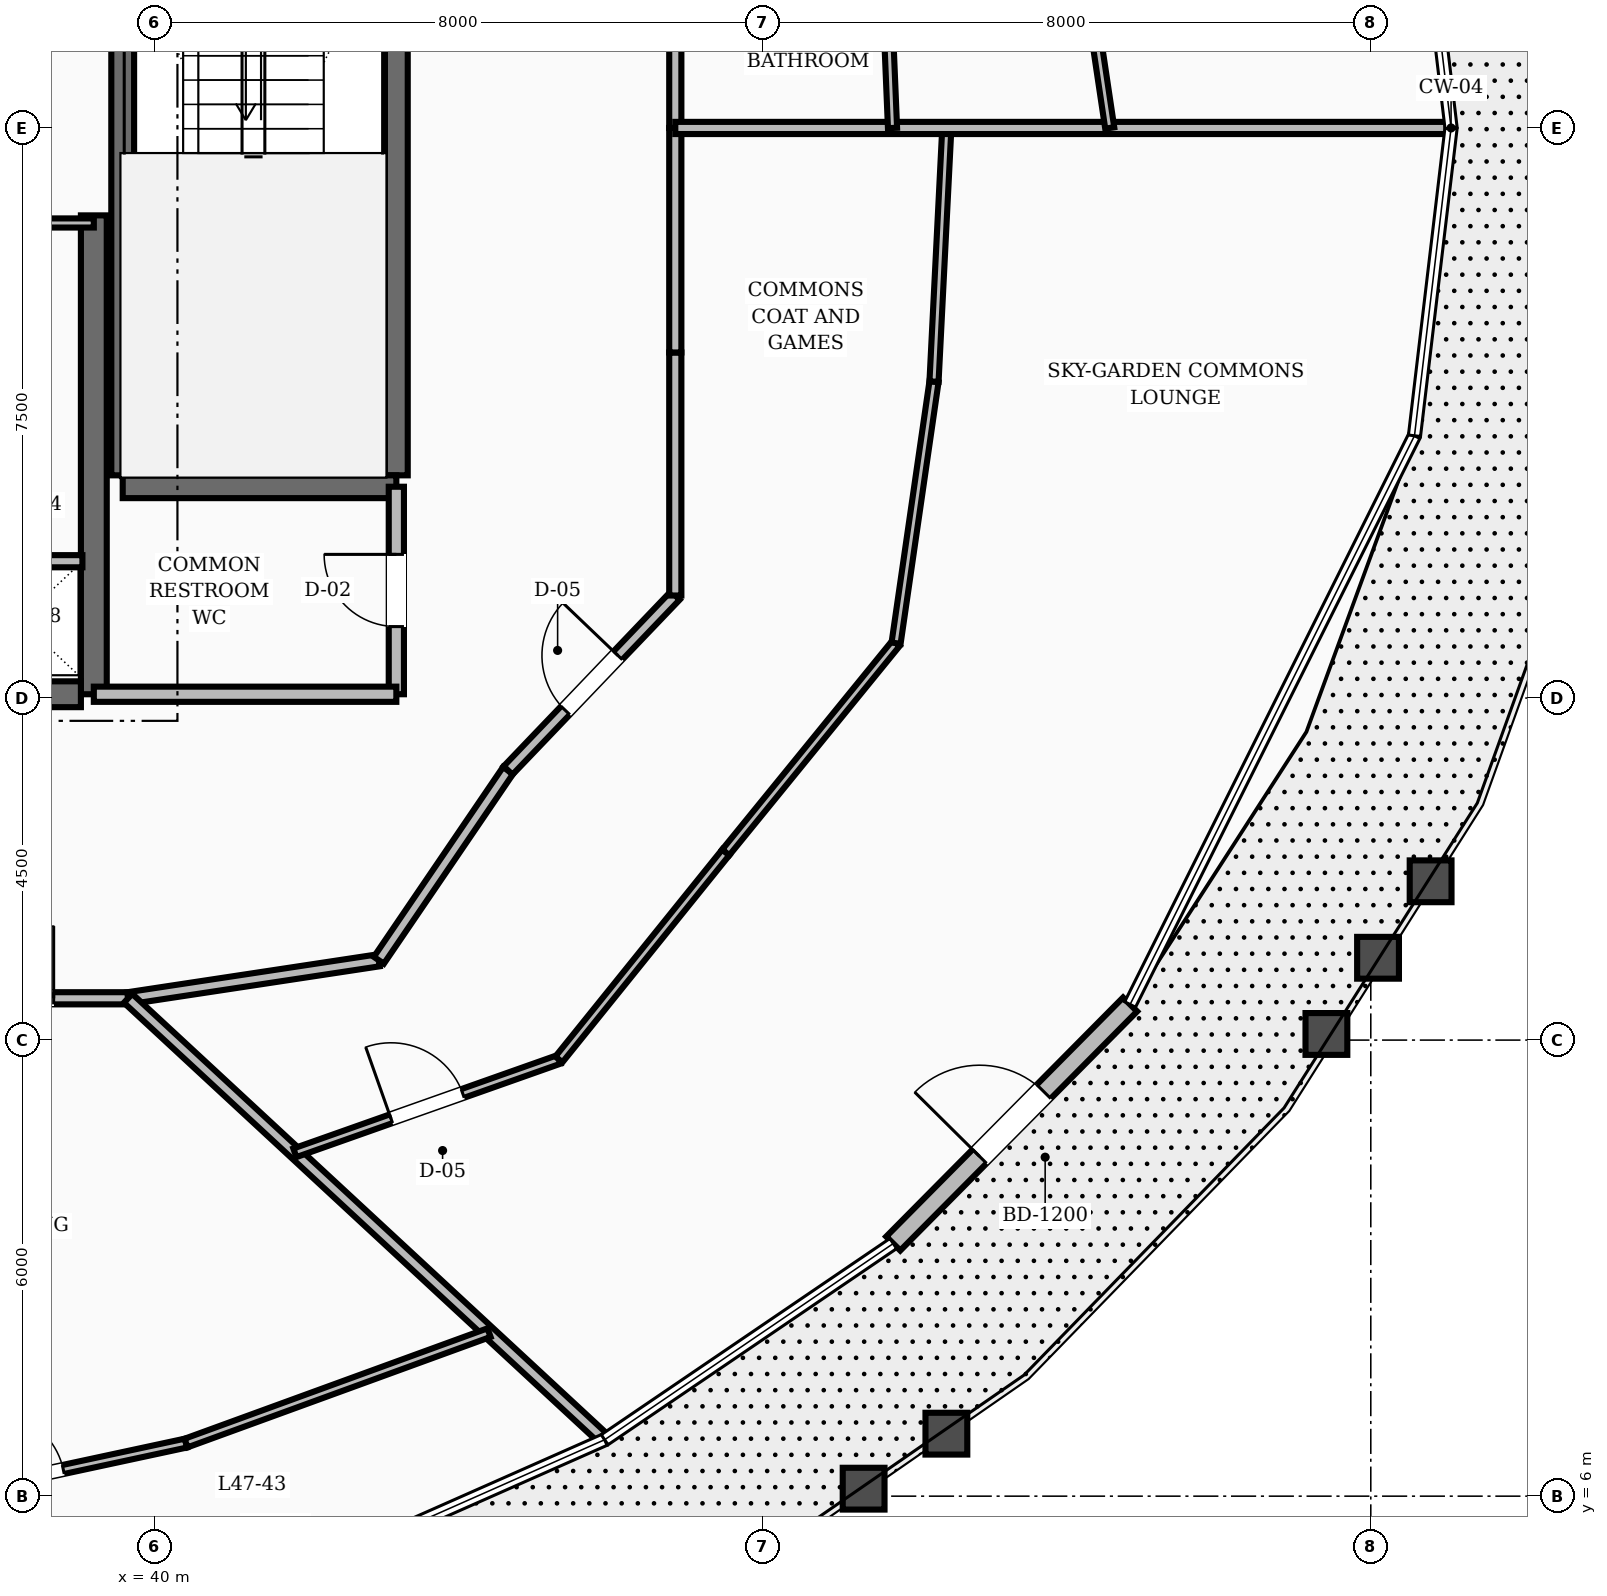
"""IFC4 building model, lengths in metres.
Left out: names, types, materials, properties, quantities, classifications, styles, units other than length and angle.
Written with IfcOpenShell. Run it as: python <this file> out.ifc"""

import sys

from ifc_helpers import new_model, si_unit, direction, frame, frame_2d, origin, place, context, subcontext, project, spatial, rectangle, extrude, element, fill, save


model = new_model("IFC4")
c1 = context("Model", 3, precision=1e-05, world=origin(), true_north=direction((0.0, 1.0)))
c2 = subcontext(c1, "Body", "Model", "MODEL_VIEW")
j1 = project(units=[si_unit("LENGTHUNIT", "METRE"), si_unit("PLANEANGLEUNIT", "RADIAN")], contexts=[c1])
p1 = place(None, origin())
s1 = spatial("IfcSite", under=j1, at=p1, CompositionType="ELEMENT")
p2 = place(p1, origin())
s2 = spatial("IfcBuilding", under=s1, at=p2, CompositionType="ELEMENT")
p3 = place(p2, frame((0.0, 0.0, 182.0)))
s3 = spatial("IfcBuildingStorey", under=s2, at=p3, CompositionType="ELEMENT", Elevation=182.0)
p4 = place(p3, frame((39.2, 16.55, 0.0), z_axis=(0.0, 0.0, 1.0), x_axis=(0.0, 1.0, 0.0)))
e1 = element("IfcWall", 1, at=p4, inside=s3, PredefinedType="SHEAR", context=c2, shape_type="SweptSolid", body=[
    extrude(rectangle(XDim=6.3, YDim=0.34, at=frame_2d((3.15, 0.0))), origin(), (0.0, 0.0, 1.0), 3.6),
])
p5 = place(p3, frame((35.8, 16.55, 0.0), z_axis=(0.0, 0.0, 1.0), x_axis=(1.0, 0.0, 0.0)))
e2 = element("IfcWall", 2, at=p5, inside=s3, PredefinedType="SHEAR", context=c2, shape_type="SweptSolid", body=[
    extrude(rectangle(XDim=3.23, YDim=0.34, at=frame_2d((1.615, 0.0))), origin(), (0.0, 0.0, 1.0), 3.6),
])
p6 = place(p5, frame((0.3, 0.0, 0.0)))
e3 = element("IfcOpeningElement", 3, at=p6, cuts=e2, PredefinedType="OPENING", context=c2, shape_type="SweptSolid", body=[
    extrude(rectangle(XDim=1.1, YDim=2.1, at=frame_2d((0.55, 1.05))), frame((0.0, 0.18, 0.0), z_axis=(0.0, -1.0, 0.0), x_axis=(1.0, 0.0, 0.0)), (0.0, 0.0, 1.0), 0.36),
])
for number, where, z_axis, x_axis in (
    (4, (43.18, 19.43, 0.0), (0.0, 0.0, 1.0), (0.0, 1.0, 0.0)),
    (5, (39.58, 19.43, 0.0), (0.0, 0.0, 1.0), (0.0, 1.0, 0.0)),
):
    element("IfcWall", number, at=place(p3, frame(where, z_axis=z_axis, x_axis=x_axis)), inside=s3, PredefinedType="SHEAR", context=c2, shape_type="SweptSolid", body=[
        extrude(rectangle(XDim=8.74, YDim=0.3, at=frame_2d((4.37, 0.0))), origin(), (0.0, 0.0, 1.0), 3.6),
    ])
p7 = place(p3, frame((39.58, 19.28, 0.0), z_axis=(0.0, 0.0, 1.0), x_axis=(1.0, 0.0, 0.0)))
e6 = element("IfcWall", 6, at=p7, inside=s3, PredefinedType="SHEAR", context=c2, shape_type="SweptSolid", body=[
    extrude(rectangle(XDim=3.6, YDim=0.3, at=frame_2d((1.8, 0.0))), origin(), (0.0, 0.0, 1.0), 3.6),
])
p8 = place(p3, frame((49.717, 9.323, 0.0), z_axis=(0.0, 0.0, 1.0), x_axis=(0.703818286912, 0.710380052513, 0.0)))
e7 = element("IfcWall", 7, at=p8, inside=s3, PredefinedType="STANDARD", context=c2, shape_type="SweptSolid", body=[
    extrude(rectangle(XDim=4.427, YDim=0.26, at=frame_2d((2.214, 0.0))), origin(), (0.0, 0.0, 1.0), 2.82),
])
p9 = place(p8, frame((1.614, 0.0, 0.0)))
e8 = element("IfcOpeningElement", 8, at=p9, cuts=e7, PredefinedType="OPENING", context=c2, shape_type="SweptSolid", body=[
    extrude(rectangle(XDim=1.2, YDim=2.15, at=frame_2d((0.6, 1.075))), frame((0.0, 0.14, 0.0), z_axis=(0.0, -1.0, 0.0), x_axis=(1.0, 0.0, 0.0)), (0.0, 0.0, 1.0), 0.28),
])
p10 = place(p3, frame((43.18, 16.55, 0.0), z_axis=(0.0, 0.0, 1.0), x_axis=(0.0, 1.0, 0.0)))
e9 = element("IfcWall", 9, at=p10, inside=s3, PredefinedType="SOLIDWALL", context=c2, shape_type="SweptSolid", body=[
    extrude(rectangle(XDim=2.73, YDim=0.2, at=frame_2d((1.365, 0.0))), origin(), (0.0, 0.0, 1.0), 2.8),
])
p11 = place(p10, frame((0.89, 0.0, 0.0)))
e10 = element("IfcOpeningElement", 10, at=p11, cuts=e9, PredefinedType="OPENING", context=c2, shape_type="SweptSolid", body=[
    extrude(rectangle(XDim=0.95, YDim=2.1, at=frame_2d((0.475, 1.05))), frame((0.0, 0.11, 0.0), z_axis=(0.0, -1.0, 0.0), x_axis=(1.0, 0.0, 0.0)), (0.0, 0.0, 1.0), 0.22),
])
p12 = place(p3, frame((39.2, 16.55, 0.0), z_axis=(0.0, 0.0, 1.0), x_axis=(1.0, 0.0, 0.0)))
e11 = element("IfcWall", 11, at=p12, inside=s3, PredefinedType="SOLIDWALL", context=c2, shape_type="SweptSolid", body=[
    extrude(rectangle(XDim=3.98, YDim=0.2, at=frame_2d((1.99, 0.0))), origin(), (0.0, 0.0, 1.0), 2.8),
])
p13 = place(p3, frame((37.4, 18.3, 0.0), z_axis=(0.0, 0.0, 1.0), x_axis=(1.0, 0.0, 0.0)))
e12 = element("IfcWall", 12, at=p13, inside=s3, PredefinedType="SOLIDWALL", context=c2, shape_type="SweptSolid", body=[
    extrude(rectangle(XDim=1.65, YDim=0.16, at=frame_2d((0.825, 0.0))), origin(), (0.0, 0.0, 1.0), 2.8),
])
p14 = place(p3, frame((37.4, 22.75, 0.0), z_axis=(0.0, 0.0, 1.0), x_axis=(1.0, 0.0, 0.0)))
e13 = element("IfcWall", 13, at=p14, inside=s3, PredefinedType="PARTITIONING", context=c2, shape_type="SweptSolid", body=[
    extrude(rectangle(XDim=1.8, YDim=0.12, at=frame_2d((0.9, 0.0))), origin(), (0.0, 0.0, 1.0), 2.8),
])
p15 = place(p3, frame((46.85, 24.0, 0.0), z_axis=(0.0, 0.0, 1.0), x_axis=(0.0, 1.0, 0.0)))
e14 = element("IfcWall", 14, at=p15, inside=s3, PredefinedType="SOLIDWALL", context=c2, shape_type="SweptSolid", body=[
    extrude(rectangle(XDim=2.954, YDim=0.16, at=frame_2d((1.477, 0.0))), origin(), (0.0, 0.0, 1.0), 2.8),
])
p16 = place(p3, frame((36.743, 12.55, 0.0), z_axis=(0.0, 0.0, 1.0), x_axis=(1.0, 0.0, 0.0)))
e15 = element("IfcWall", 15, at=p16, inside=s3, PredefinedType="SOLIDWALL", context=c2, shape_type="SweptSolid", body=[
    extrude(rectangle(XDim=2.908, YDim=0.16, at=frame_2d((1.454, 0.0))), origin(), (0.0, 0.0, 1.0), 2.8),
])
p17 = place(p16, frame((0.979, 0.0, 0.0)))
e16 = element("IfcOpeningElement", 16, at=p17, cuts=e15, PredefinedType="OPENING", context=c2, shape_type="SweptSolid", body=[
    extrude(rectangle(XDim=0.95, YDim=2.1, at=frame_2d((0.475, 1.05))), frame((0.0, 0.09, 0.0), z_axis=(0.0, -1.0, 0.0), x_axis=(1.0, 0.0, 0.0)), (0.0, 0.0, 1.0), 0.18),
])
p18 = place(p3, frame((39.651, 12.55, 0.0), z_axis=(0.0, 0.0, 1.0), x_axis=(0.988710906508, 0.149835721217, 0.0)))
e17 = element("IfcWall", 17, at=p18, inside=s3, PredefinedType="SOLIDWALL", context=c2, shape_type="SweptSolid", body=[
    extrude(rectangle(XDim=3.337, YDim=0.16, at=frame_2d((1.668, 0.0))), origin(), (0.0, 0.0, 1.0), 2.8),
])
p19 = place(p3, frame((42.95, 13.05, 0.0), z_axis=(0.0, 0.0, 1.0), x_axis=(0.562674669208, 0.826678423955, 0.0)))
e18 = element("IfcWall", 18, at=p19, inside=s3, PredefinedType="SOLIDWALL", context=c2, shape_type="SweptSolid", body=[
    extrude(rectangle(XDim=3.021, YDim=0.16, at=frame_2d((1.511, 0.0))), origin(), (0.0, 0.0, 1.0), 2.8),
])
p20 = place(p3, frame((44.65, 15.548, 0.0), z_axis=(0.0, 0.0, 1.0), x_axis=(0.691055487108, 0.722801711216, 0.0)))
e19 = element("IfcWall", 19, at=p20, inside=s3, PredefinedType="SOLIDWALL", context=c2, shape_type="SweptSolid", body=[
    extrude(rectangle(XDim=3.184, YDim=0.16, at=frame_2d((1.592, 0.0))), origin(), (0.0, 0.0, 1.0), 2.8),
])
p21 = place(p20, frame((1.092, 0.0, 0.0)))
e20 = element("IfcOpeningElement", 20, at=p21, cuts=e19, PredefinedType="OPENING", context=c2, shape_type="SweptSolid", body=[
    extrude(rectangle(XDim=1.0, YDim=2.1, at=frame_2d((0.5, 1.05))), frame((0.0, 0.09, 0.0), z_axis=(0.0, -1.0, 0.0), x_axis=(1.0, 0.0, 0.0)), (0.0, 0.0, 1.0), 0.18),
])
p22 = place(p3, frame((46.85, 17.849, 0.0), z_axis=(0.0, 0.0, 1.0), x_axis=(0.0, 1.0, 0.0)))
e21 = element("IfcWall", 21, at=p22, inside=s3, PredefinedType="SOLIDWALL", context=c2, shape_type="SweptSolid", body=[
    extrude(rectangle(XDim=3.197, YDim=0.16, at=frame_2d((1.599, 0.0))), origin(), (0.0, 0.0, 1.0), 2.8),
])
p23 = place(p3, frame((46.85, 21.046, 0.0), z_axis=(0.0, 0.0, 1.0), x_axis=(0.0, 1.0, 0.0)))
e22 = element("IfcWall", 22, at=p23, inside=s3, PredefinedType="SOLIDWALL", context=c2, shape_type="SweptSolid", body=[
    extrude(rectangle(XDim=2.954, YDim=0.16, at=frame_2d((1.477, 0.0))), origin(), (0.0, 0.0, 1.0), 2.8),
])
p24 = place(p3, frame((39.651, 12.55, 0.0), z_axis=(0.0, 0.0, 1.0), x_axis=(0.733614757442, -0.679565587462, 0.0)))
e23 = element("IfcWall", 23, at=p24, inside=s3, PredefinedType="SOLIDWALL", context=c2, shape_type="SweptSolid", body=[
    extrude(rectangle(XDim=8.497, YDim=0.16, at=frame_2d((4.248, 0.0))), origin(), (0.0, 0.0, 1.0), 2.8),
])
p25 = place(p3, frame((41.845, 10.517, 0.0), z_axis=(0.0, 0.0, 1.0), x_axis=(0.942788299014, 0.333391996369, 0.0)))
e24 = element("IfcWall", 24, at=p25, inside=s3, PredefinedType="PARTITIONING", context=c2, shape_type="SweptSolid", body=[
    extrude(rectangle(XDim=3.684, YDim=0.12, at=frame_2d((1.842, 0.0))), origin(), (0.0, 0.0, 1.0), 2.8),
])
p26 = place(p25, frame((1.342, 0.0, 0.0)))
e25 = element("IfcOpeningElement", 25, at=p26, cuts=e24, PredefinedType="OPENING", context=c2, shape_type="SweptSolid", body=[
    extrude(rectangle(XDim=1.0, YDim=2.1, at=frame_2d((0.5, 1.05))), frame((0.0, 0.07, 0.0), z_axis=(0.0, -1.0, 0.0), x_axis=(1.0, 0.0, 0.0)), (0.0, 0.0, 1.0), 0.14),
])
p27 = place(p3, frame((45.319, 11.746, 0.0), z_axis=(0.0, 0.0, 1.0), x_axis=(0.627490559783, 0.778624169534, 0.0)))
e26 = element("IfcWall", 26, at=p27, inside=s3, PredefinedType="PARTITIONING", context=c2, shape_type="SweptSolid", body=[
    extrude(rectangle(XDim=3.499, YDim=0.12, at=frame_2d((1.75, 0.0))), origin(), (0.0, 0.0, 1.0), 2.8),
])
p28 = place(p3, frame((47.514, 14.47, 0.0), z_axis=(0.0, 0.0, 1.0), x_axis=(0.631392655223, 0.775463290511, 0.0)))
e27 = element("IfcWall", 27, at=p28, inside=s3, PredefinedType="PARTITIONING", context=c2, shape_type="SweptSolid", body=[
    extrude(rectangle(XDim=3.549, YDim=0.12, at=frame_2d((1.774, 0.0))), origin(), (0.0, 0.0, 1.0), 2.8),
])
p29 = place(p3, frame((49.755, 17.222, 0.0), z_axis=(0.0, 0.0, 1.0), x_axis=(0.143514782999, 0.989648173373, 0.0)))
e28 = element("IfcWall", 28, at=p29, inside=s3, PredefinedType="PARTITIONING", context=c2, shape_type="SweptSolid", body=[
    extrude(rectangle(XDim=3.477, YDim=0.12, at=frame_2d((1.739, 0.0))), origin(), (0.0, 0.0, 1.0), 2.8),
])
p30 = place(p3, frame((50.254, 20.663, 0.0), z_axis=(0.0, 0.0, 1.0), x_axis=(0.050414994906, 0.998728355605, 0.0)))
e29 = element("IfcWall", 29, at=p30, inside=s3, PredefinedType="PARTITIONING", context=c2, shape_type="SweptSolid", body=[
    extrude(rectangle(XDim=3.341, YDim=0.12, at=frame_2d((1.671, 0.0))), origin(), (0.0, 0.0, 1.0), 2.8),
])
p31 = place(p3, frame((46.85, 24.0, 0.0), z_axis=(0.0, 0.0, 1.0), x_axis=(1.0, 0.0, 0.0)))
e30 = element("IfcWall", 30, at=p31, inside=s3, PredefinedType="SOLIDWALL", context=c2, shape_type="SweptSolid", body=[
    extrude(rectangle(XDim=10.156, YDim=0.16, at=frame_2d((5.078, 0.0))), origin(), (0.0, 0.0, 1.0), 2.8),
])
p32 = place(p3, frame((49.708, 24.0, 0.0), z_axis=(0.0, 0.0, 1.0), x_axis=(-0.041297572746, 0.999146891345, 0.0)))
e31 = element("IfcWall", 31, at=p32, inside=s3, PredefinedType="PARTITIONING", context=c2, shape_type="SweptSolid", body=[
    extrude(rectangle(XDim=3.263, YDim=0.12, at=frame_2d((1.632, 0.0))), origin(), (0.0, 0.0, 1.0), 2.8),
])
p33 = place(p3, frame((52.565, 24.0, 0.0), z_axis=(0.0, 0.0, 1.0), x_axis=(-0.147655518548, 0.989038850522, 0.0)))
e32 = element("IfcWall", 32, at=p33, inside=s3, PredefinedType="PARTITIONING", context=c2, shape_type="SweptSolid", body=[
    extrude(rectangle(XDim=7.234, YDim=0.12, at=frame_2d((3.617, 0.0))), origin(), (0.0, 0.0, 1.0), 2.8),
])
p34 = place(p33, frame((4.331, 0.0, 0.0)))
e33 = element("IfcOpeningElement", 33, at=p34, cuts=e32, PredefinedType="OPENING", context=c2, shape_type="SweptSolid", body=[
    extrude(rectangle(XDim=0.95, YDim=2.1, at=frame_2d((0.475, 1.05))), frame((0.0, 0.07, 0.0), z_axis=(0.0, -1.0, 0.0), x_axis=(1.0, 0.0, 0.0)), (0.0, 0.0, 1.0), 0.14),
])
p35 = place(p3, frame((36.255, 5.804, 0.0), z_axis=(0.0, 0.0, 1.0), x_axis=(0.977643362971, 0.210269957053, 0.0)))
e34 = element("IfcWall", 34, at=p35, inside=s3, PredefinedType="PARTITIONING", context=c2, shape_type="SweptSolid", body=[
    extrude(rectangle(XDim=4.253, YDim=0.12, at=frame_2d((2.126, 0.0))), origin(), (0.0, 0.0, 1.0), 2.8),
])
p36 = place(p35, frame((1.652, 0.0, 0.0)))
e35 = element("IfcOpeningElement", 35, at=p36, cuts=e34, PredefinedType="OPENING", context=c2, shape_type="SweptSolid", body=[
    extrude(rectangle(XDim=0.95, YDim=2.1, at=frame_2d((0.475, 1.05))), frame((0.0, 0.07, 0.0), z_axis=(0.0, -1.0, 0.0), x_axis=(1.0, 0.0, 0.0)), (0.0, 0.0, 1.0), 0.14),
])
p37 = place(p3, frame((40.413, 6.698, 0.0), z_axis=(0.0, 0.0, 1.0), x_axis=(0.939549590204, 0.342412861247, 0.0)))
e36 = element("IfcWall", 36, at=p37, inside=s3, PredefinedType="PARTITIONING", context=c2, shape_type="SweptSolid", body=[
    extrude(rectangle(XDim=4.243, YDim=0.12, at=frame_2d((2.122, 0.0))), origin(), (0.0, 0.0, 1.0), 2.8),
])
p38 = place(p9, origin())
e37 = element("IfcDoor", 37, at=p38, inside=s3, OperationType="SINGLE_SWING_LEFT", PredefinedType="DOOR", context=c2, shape_type="SweptSolid", body=[
    extrude(rectangle(XDim=1.2, YDim=2.15, at=frame_2d((0.6, 1.075))), frame((0.0, 0.025, 0.0), z_axis=(0.0, -1.0, 0.0), x_axis=(1.0, 0.0, 0.0)), (0.0, 0.0, 1.0), 0.05),
])
fill(e8, e37)
p39 = place(p11, origin())
e38 = element("IfcDoor", 38, at=p39, inside=s3, OperationType="SINGLE_SWING_RIGHT", PredefinedType="DOOR", context=c2, shape_type="SweptSolid", body=[
    extrude(rectangle(XDim=0.95, YDim=2.1, at=frame_2d((0.475, 1.05))), frame((0.0, 0.025, 0.0), z_axis=(0.0, -1.0, 0.0), x_axis=(1.0, 0.0, 0.0)), (0.0, 0.0, 1.0), 0.05),
])
fill(e10, e38)
p40 = place(p21, origin())
e39 = element("IfcDoor", 39, at=p40, inside=s3, OperationType="SINGLE_SWING_RIGHT", PredefinedType="DOOR", context=c2, shape_type="SweptSolid", body=[
    extrude(rectangle(XDim=1.0, YDim=2.1, at=frame_2d((0.5, 1.05))), frame((0.0, 0.025, 0.0), z_axis=(0.0, -1.0, 0.0), x_axis=(1.0, 0.0, 0.0)), (0.0, 0.0, 1.0), 0.05),
])
fill(e20, e39)
p41 = place(p26, origin())
e40 = element("IfcDoor", 40, at=p41, inside=s3, OperationType="SINGLE_SWING_LEFT", PredefinedType="DOOR", context=c2, shape_type="SweptSolid", body=[
    extrude(rectangle(XDim=1.0, YDim=2.1, at=frame_2d((0.5, 1.05))), frame((0.0, 0.025, 0.0), z_axis=(0.0, -1.0, 0.0), x_axis=(1.0, 0.0, 0.0)), (0.0, 0.0, 1.0), 0.05),
])
fill(e25, e40)
p42 = place(p17, origin())
e41 = element("IfcDoor", 41, at=p42, inside=s3, OperationType="SINGLE_SWING_RIGHT", PredefinedType="DOOR", context=c2, shape_type="SweptSolid", body=[
    extrude(rectangle(XDim=0.95, YDim=2.1, at=frame_2d((0.475, 1.05))), frame((0.0, 0.025, 0.0), z_axis=(0.0, -1.0, 0.0), x_axis=(1.0, 0.0, 0.0)), (0.0, 0.0, 1.0), 0.05),
])
fill(e16, e41)
p43 = place(p36, origin())
e42 = element("IfcDoor", 42, at=p43, inside=s3, OperationType="SINGLE_SWING_LEFT", PredefinedType="DOOR", context=c2, shape_type="SweptSolid", body=[
    extrude(rectangle(XDim=0.95, YDim=2.1, at=frame_2d((0.475, 1.05))), frame((0.0, 0.025, 0.0), z_axis=(0.0, -1.0, 0.0), x_axis=(1.0, 0.0, 0.0)), (0.0, 0.0, 1.0), 0.05),
])
fill(e35, e42)
save(model, sys.argv[1])
